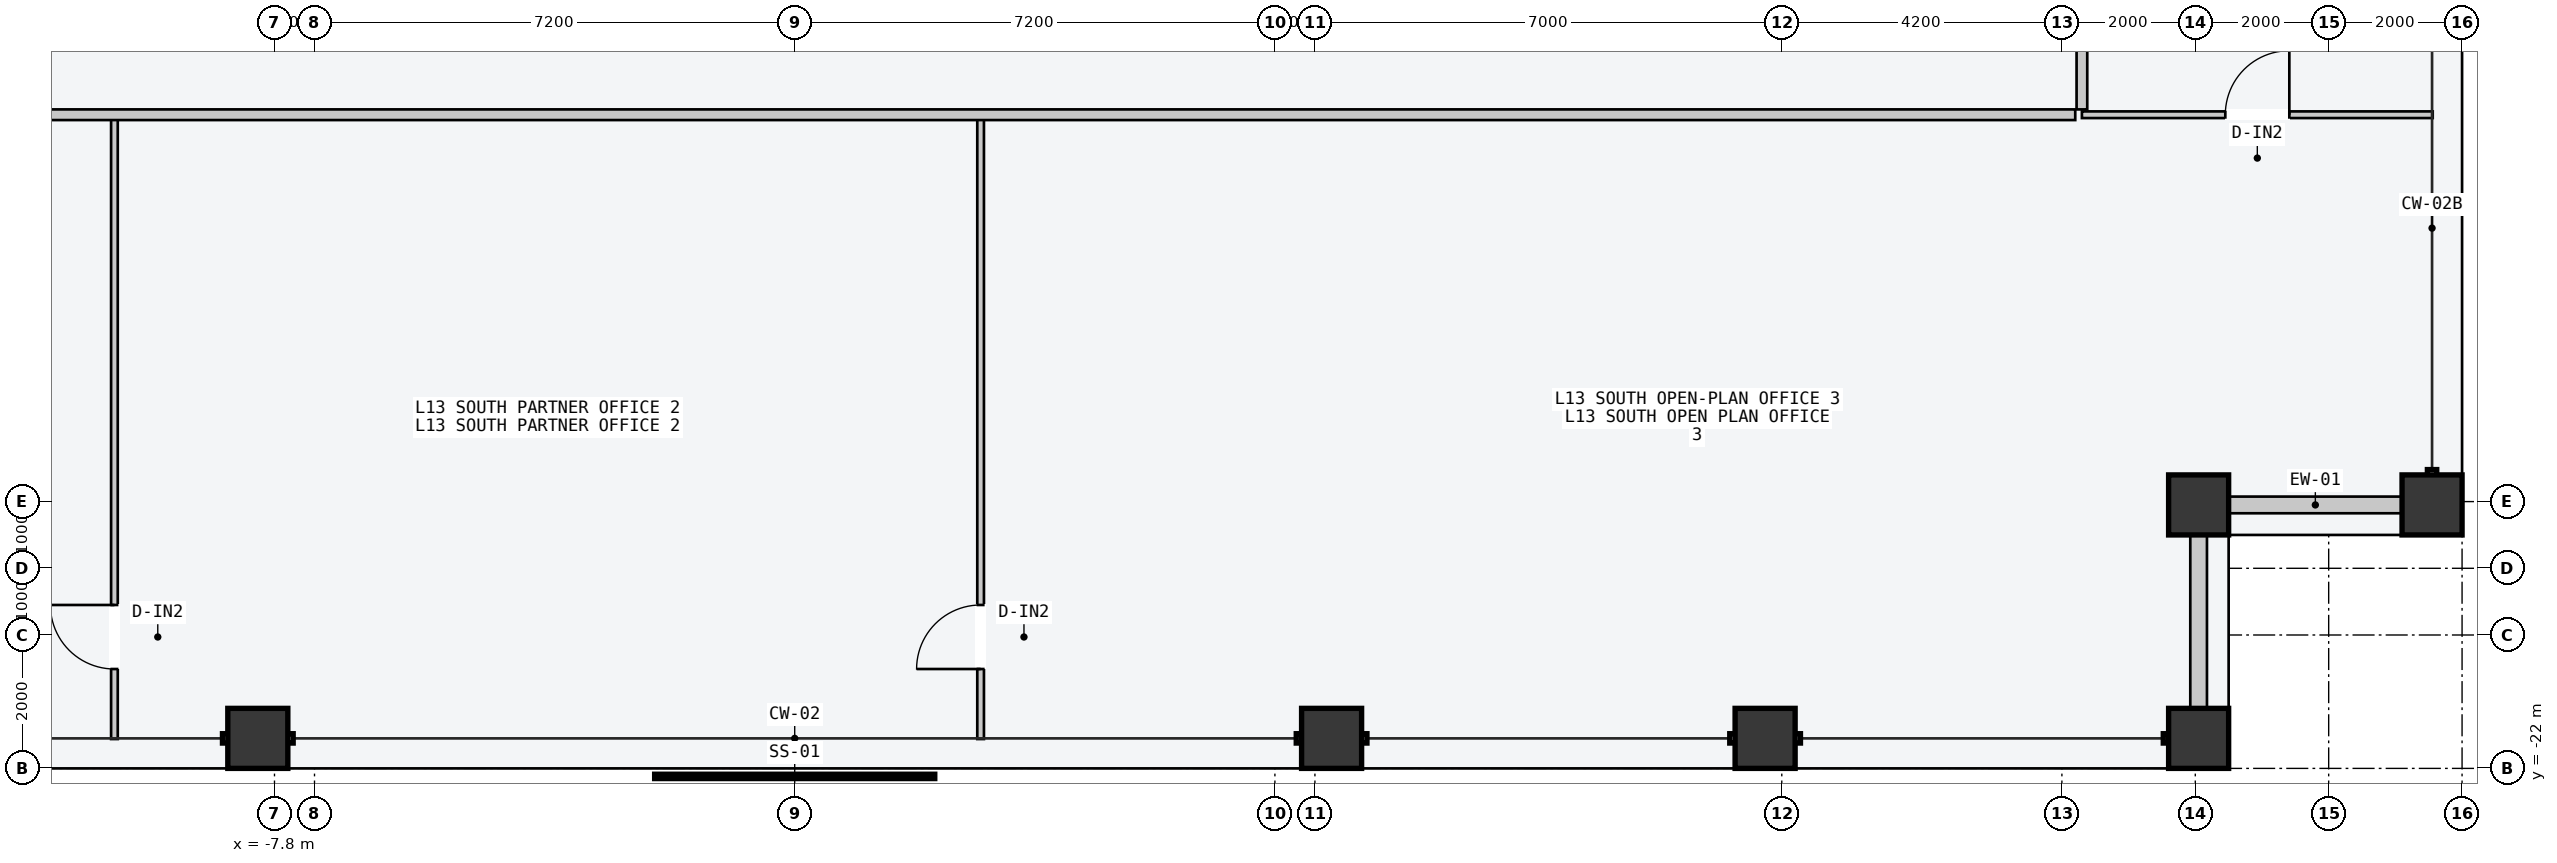
"""IFC4 building model, lengths in metres.
Left out: names, types, materials, properties, quantities, classifications, styles, units other than length and angle.
Written with IfcOpenShell. Run it as: python <this file> out.ifc"""

import sys

from ifc_helpers import new_model, si_unit, direction, frame, frame_2d, origin, origin_2d, place, context, subcontext, project, spatial, rectangle, hollow_rectangle, extrude, element, fill, save


model = new_model("IFC4")
c1 = context("Model", 3, precision=1e-05, world=origin(), true_north=direction((0.0, 1.0)))
c2 = subcontext(c1, "Body", "Model", "MODEL_VIEW")
j1 = project(units=[si_unit("LENGTHUNIT", "METRE"), si_unit("PLANEANGLEUNIT", "RADIAN")], contexts=[c1])
p1 = place(None, origin())
s1 = spatial("IfcSite", under=j1, at=p1, CompositionType="ELEMENT")
p2 = place(p1, origin())
s2 = spatial("IfcBuilding", under=s1, at=p2, CompositionType="ELEMENT")
p3 = place(p2, frame((0.0, 0.0, 52.8)))
s3 = spatial("IfcBuildingStorey", under=s2, at=p3, CompositionType="ELEMENT", Elevation=52.8)
for number, where, z_axis, x_axis in (
    (1, (-8.05, -21.55, 0.0), (0.0, 0.0, 1.0), (1.0, 0.0, 0.0)),
    (2, (8.05, -21.55, 0.0), (0.0, 0.0, 1.0), (1.0, 0.0, 0.0)),
    (3, (14.55, -21.55, 0.0), (0.0, 0.0, 1.0), (1.0, 0.0, 0.0)),
    (4, (21.05, -21.55, 0.0), (0.0, 0.0, 1.0), (1.0, 0.0, 0.0)),
    (5, (24.55, -18.05, 0.0), (0.0, 0.0, 1.0), (0.0, 1.0, 0.0)),
    (6, (21.05, -18.05, 0.0), (0.0, 0.0, 1.0), (1.0, 0.0, 0.0)),
):
    element("IfcColumn", number, at=place(p3, frame(where, z_axis=z_axis, x_axis=x_axis)), inside=s3, PredefinedType="COLUMN", context=c2, shape_type="SweptSolid", body=[
        extrude(hollow_rectangle(XDim=0.9, YDim=0.9, WallThickness=0.045, at=origin_2d()), origin(), (0.0, 0.0, 1.0), 3.6),
    ])
for number, where, z_axis, x_axis in (
    (7, (21.51, -18.05, 0.0), (0.0, 0.0, 1.0), (1.0, 0.0, 0.0)),
    (8, (21.05, -21.09, 0.0), (0.0, 0.0, 1.0), (0.0, 1.0, 0.0)),
):
    element("IfcWall", number, at=place(p3, frame(where, z_axis=z_axis, x_axis=x_axis)), inside=s3, PredefinedType="STANDARD", context=c2, shape_type="SweptSolid", body=[
        extrude(rectangle(XDim=2.58, YDim=0.25, at=frame_2d((1.29, 0.0))), origin(), (0.0, 0.0, 1.0), 2.7),
    ])
p4 = place(p3, frame((-10.2, -21.56, 0.0), z_axis=(0.0, 0.0, 1.0), x_axis=(0.0, 1.0, 0.0)))
e9 = element("IfcWall", 9, at=p4, inside=s3, PredefinedType="PARTITIONING", context=c2, shape_type="SweptSolid", body=[
    extrude(rectangle(XDim=9.3, YDim=0.1, at=frame_2d((4.65, 0.0))), origin(), (0.0, 0.0, 1.0), 3.4),
])
p5 = place(p4, frame((1.05, 0.0, 0.0)))
e10 = element("IfcOpeningElement", 10, at=p5, cuts=e9, PredefinedType="OPENING", context=c2, shape_type="SweptSolid", body=[
    extrude(rectangle(XDim=0.96, YDim=2.18, at=frame_2d((0.48, 1.09))), frame((0.0, 0.06, 0.0), z_axis=(0.0, -1.0, 0.0), x_axis=(1.0, 0.0, 0.0)), (0.0, 0.0, 1.0), 0.12),
])
p6 = place(p3, frame((2.787, -21.56, 0.0), z_axis=(0.0, 0.0, 1.0), x_axis=(0.0, 1.0, 0.0)))
e11 = element("IfcWall", 11, at=p6, inside=s3, PredefinedType="PARTITIONING", context=c2, shape_type="SweptSolid", body=[
    extrude(rectangle(XDim=9.3, YDim=0.1, at=frame_2d((4.65, 0.0))), origin(), (0.0, 0.0, 1.0), 3.4),
])
p7 = place(p6, frame((1.05, 0.0, 0.0)))
e12 = element("IfcOpeningElement", 12, at=p7, cuts=e11, PredefinedType="OPENING", context=c2, shape_type="SweptSolid", body=[
    extrude(rectangle(XDim=0.96, YDim=2.18, at=frame_2d((0.48, 1.09))), frame((0.0, 0.06, 0.0), z_axis=(0.0, -1.0, 0.0), x_axis=(1.0, 0.0, 0.0)), (0.0, 0.0, 1.0), 0.12),
])
p8 = place(p3, frame((-19.2, -12.2, 0.0), z_axis=(0.0, 0.0, 1.0), x_axis=(1.0, 0.0, 0.0)))
e13 = element("IfcWall", 13, at=p8, inside=s3, PredefinedType="PARTITIONING", context=c2, shape_type="SweptSolid", body=[
    extrude(rectangle(XDim=38.4, YDim=0.16, at=frame_2d((19.2, 0.0))), origin(), (0.0, 0.0, 1.0), 1.74),
])
p9 = place(p3, frame((19.3, -12.2, 0.0), z_axis=(0.0, 0.0, 1.0), x_axis=(1.0, 0.0, 0.0)))
e14 = element("IfcWall", 14, at=p9, inside=s3, PredefinedType="PARTITIONING", context=c2, shape_type="SweptSolid", body=[
    extrude(rectangle(XDim=5.26, YDim=0.1, at=frame_2d((2.63, 0.0))), origin(), (0.0, 0.0, 1.0), 3.4),
])
p10 = place(p9, frame((2.15, 0.0, 0.0)))
e15 = element("IfcOpeningElement", 15, at=p10, cuts=e14, PredefinedType="OPENING", context=c2, shape_type="SweptSolid", body=[
    extrude(rectangle(XDim=0.96, YDim=2.18, at=frame_2d((0.48, 1.09))), frame((0.0, 0.06, 0.0), z_axis=(0.0, -1.0, 0.0), x_axis=(1.0, 0.0, 0.0)), (0.0, 0.0, 1.0), 0.12),
])
p11 = place(p3, frame((19.3, -12.12, 0.0), z_axis=(0.0, 0.0, 1.0), x_axis=(0.0, 1.0, 0.0)))
e16 = element("IfcWall", 16, at=p11, inside=s3, PredefinedType="PARTITIONING", context=c2, shape_type="SweptSolid", body=[
    extrude(rectangle(XDim=26.54, YDim=0.16, at=frame_2d((13.27, 0.0))), origin(), (0.0, 0.0, 1.0), 3.4),
])
p12 = place(p11, frame((4.953, 0.0, 0.0)))
e17 = element("IfcOpeningElement", 17, at=p12, cuts=e16, PredefinedType="OPENING", context=c2, shape_type="SweptSolid", body=[
    extrude(rectangle(XDim=1.24, YDim=2.24, at=frame_2d((0.62, 1.12))), frame((0.0, 0.09, 0.0), z_axis=(0.0, -1.0, 0.0), x_axis=(1.0, 0.0, 0.0)), (0.0, 0.0, 1.0), 0.18),
])
p13 = place(p11, frame((18.143, 0.0, 0.0)))
e18 = element("IfcOpeningElement", 18, at=p13, cuts=e16, PredefinedType="OPENING", context=c2, shape_type="SweptSolid", body=[
    extrude(rectangle(XDim=1.4, YDim=2.2, at=frame_2d((0.7, 1.1))), frame((0.0, 0.09, 0.0), z_axis=(0.0, -1.0, 0.0), x_axis=(1.0, 0.0, 0.0)), (0.0, 0.0, 1.0), 0.18),
])
p14 = place(p5, origin())
e19 = element("IfcDoor", 19, at=p14, inside=s3, OperationType="SINGLE_SWING_RIGHT", PredefinedType="DOOR", context=c2, shape_type="SweptSolid", body=[
    extrude(rectangle(XDim=0.96, YDim=2.18, at=frame_2d((0.48, 1.09))), frame((0.0, 0.025, 0.0), z_axis=(0.0, -1.0, 0.0), x_axis=(1.0, 0.0, 0.0)), (0.0, 0.0, 1.0), 0.05),
])
fill(e10, e19)
p15 = place(p7, origin())
e20 = element("IfcDoor", 20, at=p15, inside=s3, OperationType="SINGLE_SWING_LEFT", PredefinedType="DOOR", context=c2, shape_type="SweptSolid", body=[
    extrude(rectangle(XDim=0.96, YDim=2.18, at=frame_2d((0.48, 1.09))), frame((0.0, 0.025, 0.0), z_axis=(0.0, -1.0, 0.0), x_axis=(1.0, 0.0, 0.0)), (0.0, 0.0, 1.0), 0.05),
])
fill(e12, e20)
p16 = place(p10, origin())
e21 = element("IfcDoor", 21, at=p16, inside=s3, OperationType="SINGLE_SWING_RIGHT", PredefinedType="DOOR", context=c2, shape_type="SweptSolid", body=[
    extrude(rectangle(XDim=0.96, YDim=2.18, at=frame_2d((0.48, 1.09))), frame((0.0, 0.025, 0.0), z_axis=(0.0, -1.0, 0.0), x_axis=(1.0, 0.0, 0.0)), (0.0, 0.0, 1.0), 0.05),
])
fill(e15, e21)
save(model, sys.argv[1])
